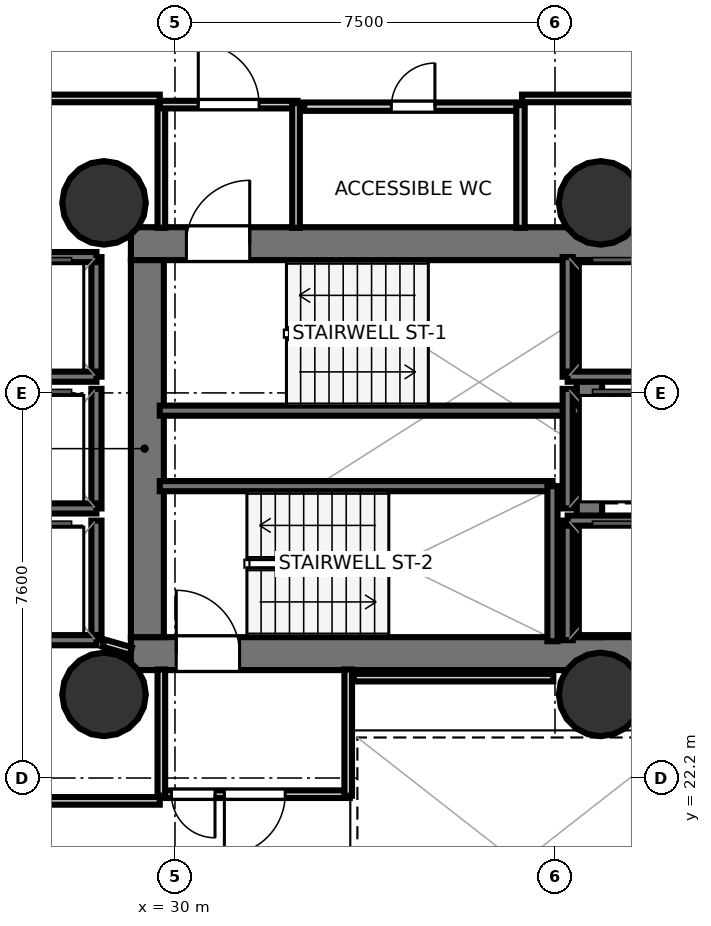
"""IFC4 building model, lengths in metres.
Left out: names, types, materials, properties, quantities, classifications, styles, units other than length and angle.
Written with IfcOpenShell. Run it as: python <this file> out.ifc"""

import sys

from ifc_helpers import new_model, si_unit, direction, frame, frame_2d, origin, origin_2d, place, context, subcontext, project, spatial, rectangle, hollow_circle, extrude, element, fill, save


model = new_model("IFC4")
c1 = context("Model", 3, precision=1e-05, world=origin(), true_north=direction((0.0, 1.0)))
c2 = subcontext(c1, "Body", "Model", "MODEL_VIEW")
j1 = project(units=[si_unit("LENGTHUNIT", "METRE"), si_unit("PLANEANGLEUNIT", "RADIAN")], contexts=[c1])
p1 = place(None, origin())
s1 = spatial("IfcSite", under=j1, at=p1, CompositionType="ELEMENT")
p2 = place(p1, origin())
s2 = spatial("IfcBuilding", under=s1, at=p2, CompositionType="ELEMENT")
p3 = place(p2, frame((0.0, 0.0, 63.6)))
s3 = spatial("IfcBuildingStorey", under=s2, at=p3, CompositionType="ELEMENT", Elevation=63.6)
p4 = place(p3, frame((29.13, 32.745, 0.0), z_axis=(0.0, 0.0, 1.0), x_axis=(1.0, 0.0, 0.0)))
e1 = element("IfcWall", 1, at=p4, inside=s3, PredefinedType="SHEAR", context=c2, shape_type="SweptSolid", body=[
    extrude(rectangle(XDim=10.72, YDim=0.65, at=frame_2d((5.36, 0.0))), origin(), (0.0, 0.0, 1.0), 3.52),
])
p5 = place(p4, frame((1.095, 0.0, 0.0)))
e2 = element("IfcOpeningElement", 2, at=p5, cuts=e1, PredefinedType="OPENING", context=c2, shape_type="SweptSolid", body=[
    extrude(rectangle(XDim=1.25, YDim=2.15, at=frame_2d((0.625, 1.075))), frame((0.0, 0.335, 0.0), z_axis=(0.0, -1.0, 0.0), x_axis=(1.0, 0.0, 0.0)), (0.0, 0.0, 1.0), 0.67),
])
p6 = place(p3, frame((29.13, 24.655, 0.0), z_axis=(0.0, 0.0, 1.0), x_axis=(1.0, 0.0, 0.0)))
e3 = element("IfcWall", 3, at=p6, inside=s3, PredefinedType="SHEAR", context=c2, shape_type="SweptSolid", body=[
    extrude(rectangle(XDim=10.72, YDim=0.65, at=frame_2d((5.36, 0.0))), origin(), (0.0, 0.0, 1.0), 3.52),
])
p7 = place(p6, frame((0.895, 0.0, 0.0)))
e4 = element("IfcOpeningElement", 4, at=p7, cuts=e3, PredefinedType="OPENING", context=c2, shape_type="SweptSolid", body=[
    extrude(rectangle(XDim=1.25, YDim=2.15, at=frame_2d((0.625, 1.075))), frame((0.0, 0.335, 0.0), z_axis=(0.0, -1.0, 0.0), x_axis=(1.0, 0.0, 0.0)), (0.0, 0.0, 1.0), 0.67),
])
p8 = place(p3, frame((29.455, 24.98, 0.0), z_axis=(0.0, 0.0, 1.0), x_axis=(0.0, 1.0, 0.0)))
e5 = element("IfcWall", 5, at=p8, inside=s3, PredefinedType="SHEAR", context=c2, shape_type="SweptSolid", body=[
    extrude(rectangle(XDim=7.44, YDim=0.65, at=frame_2d((3.72, 0.0))), origin(), (0.0, 0.0, 1.0), 3.52),
])
p9 = place(p3, frame((38.18, 24.98, 0.0), z_axis=(0.0, 0.0, 1.0), x_axis=(0.0, 1.0, 0.0)))
e6 = element("IfcWall", 6, at=p9, inside=s3, PredefinedType="SHEAR", context=c2, shape_type="SweptSolid", body=[
    extrude(rectangle(XDim=7.44, YDim=0.5, at=frame_2d((3.72, 0.0))), origin(), (0.0, 0.0, 1.0), 3.52),
])
for number, where, z_axis, x_axis in (
    (7, (28.6, 33.55, 0.0), (0.0, 0.0, 1.0), (1.0, 0.0, 0.0)),
    (8, (28.6, 23.85, 0.0), (0.0, 0.0, 1.0), (1.0, 0.0, 0.0)),
    (9, (38.4, 33.55, 0.0), (0.0, 0.0, 1.0), (1.0, 0.0, 0.0)),
    (10, (38.4, 23.85, 0.0), (0.0, 0.0, 1.0), (1.0, 0.0, 0.0)),
):
    element("IfcColumn", number, at=place(p3, frame(where, z_axis=z_axis, x_axis=x_axis)), inside=s3, PredefinedType="COLUMN", context=c2, shape_type="SweptSolid", body=[
        extrude(hollow_circle(Radius=0.825, WallThickness=0.04, at=origin_2d()), origin(), (0.0, 0.0, 1.0), 3.7),
    ])
p10 = place(p3, frame((29.7, 29.45, 0.0), z_axis=(0.0, 0.0, 1.0), x_axis=(1.0, 0.0, 0.0)))
e11 = element("IfcWall", 11, at=p10, inside=s3, PredefinedType="SOLIDWALL", context=c2, shape_type="SweptSolid", body=[
    extrude(rectangle(XDim=8.3, YDim=0.2, at=frame_2d((4.15, 0.0))), origin(), (0.0, 0.0, 1.0), 3.52),
])
p11 = place(p3, frame((29.7, 27.96, 0.0), z_axis=(0.0, 0.0, 1.0), x_axis=(1.0, 0.0, 0.0)))
e12 = element("IfcWall", 12, at=p11, inside=s3, PredefinedType="SOLIDWALL", context=c2, shape_type="SweptSolid", body=[
    extrude(rectangle(XDim=7.75, YDim=0.2, at=frame_2d((3.875, 0.0))), origin(), (0.0, 0.0, 1.0), 3.52),
])
p12 = place(p3, frame((37.45, 24.9, 0.0), z_axis=(0.0, 0.0, 1.0), x_axis=(0.0, 1.0, 0.0)))
e13 = element("IfcWall", 13, at=p12, inside=s3, PredefinedType="SOLIDWALL", context=c2, shape_type="SweptSolid", body=[
    extrude(rectangle(XDim=3.06, YDim=0.2, at=frame_2d((1.53, 0.0))), origin(), (0.0, 0.0, 1.0), 3.52),
])
p13 = place(p3, frame((37.75, 30.12, 0.0), z_axis=(0.0, 0.0, 1.0), x_axis=(0.0, 1.0, 0.0)))
e14 = element("IfcWall", 14, at=p13, inside=s3, PredefinedType="SOLIDWALL", context=c2, shape_type="SweptSolid", body=[
    extrude(rectangle(XDim=2.36, YDim=0.2, at=frame_2d((1.18, 0.0))), origin(), (0.0, 0.0, 1.0), 3.52),
])
p14 = place(p3, frame((37.75, 30.12, 0.0), z_axis=(0.0, 0.0, 1.0), x_axis=(1.0, 0.0, 0.0)))
e15 = element("IfcWall", 15, at=p14, inside=s3, PredefinedType="SOLIDWALL", context=c2, shape_type="SweptSolid", body=[
    extrude(rectangle(XDim=2.1, YDim=0.2, at=frame_2d((1.05, 0.0))), origin(), (0.0, 0.0, 1.0), 3.52),
])
p15 = place(p3, frame((37.75, 24.92, 0.0), z_axis=(0.0, 0.0, 1.0), x_axis=(0.0, 1.0, 0.0)))
e16 = element("IfcWall", 16, at=p15, inside=s3, PredefinedType="SOLIDWALL", context=c2, shape_type="SweptSolid", body=[
    extrude(rectangle(XDim=2.36, YDim=0.2, at=frame_2d((1.18, 0.0))), origin(), (0.0, 0.0, 1.0), 3.52),
])
p16 = place(p3, frame((37.75, 27.28, 0.0), z_axis=(0.0, 0.0, 1.0), x_axis=(1.0, 0.0, 0.0)))
e17 = element("IfcWall", 17, at=p16, inside=s3, PredefinedType="SOLIDWALL", context=c2, shape_type="SweptSolid", body=[
    extrude(rectangle(XDim=2.1, YDim=0.2, at=frame_2d((1.05, 0.0))), origin(), (0.0, 0.0, 1.0), 3.52),
])
p17 = place(p3, frame((28.45, 30.12, 0.0), z_axis=(0.0, 0.0, 1.0), x_axis=(0.0, 1.0, 0.0)))
e18 = element("IfcWall", 18, at=p17, inside=s3, PredefinedType="SOLIDWALL", context=c2, shape_type="SweptSolid", body=[
    extrude(rectangle(XDim=2.36, YDim=0.2, at=frame_2d((1.18, 0.0))), origin(), (0.0, 0.0, 1.0), 3.52),
])
for number, where, z_axis, x_axis in (
    (19, (26.35, 32.48, 0.0), (0.0, 0.0, 1.0), (1.0, 0.0, 0.0)),
    (20, (26.35, 30.12, 0.0), (0.0, 0.0, 1.0), (1.0, 0.0, 0.0)),
):
    element("IfcWall", number, at=place(p3, frame(where, z_axis=z_axis, x_axis=x_axis)), inside=s3, PredefinedType="SOLIDWALL", context=c2, shape_type="SweptSolid", body=[
        extrude(rectangle(XDim=2.1, YDim=0.2, at=frame_2d((1.05, 0.0))), origin(), (0.0, 0.0, 1.0), 3.52),
    ])
p18 = place(p3, frame((28.45, 27.52, 0.0), z_axis=(0.0, 0.0, 1.0), x_axis=(0.0, 1.0, 0.0)))
e21 = element("IfcWall", 21, at=p18, inside=s3, PredefinedType="SOLIDWALL", context=c2, shape_type="SweptSolid", body=[
    extrude(rectangle(XDim=2.36, YDim=0.2, at=frame_2d((1.18, 0.0))), origin(), (0.0, 0.0, 1.0), 3.52),
])
p19 = place(p3, frame((26.35, 27.52, 0.0), z_axis=(0.0, 0.0, 1.0), x_axis=(1.0, 0.0, 0.0)))
e22 = element("IfcWall", 22, at=p19, inside=s3, PredefinedType="SOLIDWALL", context=c2, shape_type="SweptSolid", body=[
    extrude(rectangle(XDim=2.1, YDim=0.2, at=frame_2d((1.05, 0.0))), origin(), (0.0, 0.0, 1.0), 3.52),
])
p20 = place(p3, frame((28.45, 24.92, 0.0), z_axis=(0.0, 0.0, 1.0), x_axis=(0.0, 1.0, 0.0)))
e23 = element("IfcWall", 23, at=p20, inside=s3, PredefinedType="SOLIDWALL", context=c2, shape_type="SweptSolid", body=[
    extrude(rectangle(XDim=2.36, YDim=0.2, at=frame_2d((1.18, 0.0))), origin(), (0.0, 0.0, 1.0), 3.52),
])
p21 = place(p3, frame((26.35, 24.92, 0.0), z_axis=(0.0, 0.0, 1.0), x_axis=(1.0, 0.0, 0.0)))
e24 = element("IfcWall", 24, at=p21, inside=s3, PredefinedType="SOLIDWALL", context=c2, shape_type="SweptSolid", body=[
    extrude(rectangle(XDim=2.1, YDim=0.2, at=frame_2d((1.05, 0.0))), origin(), (0.0, 0.0, 1.0), 3.52),
])
p22 = place(p3, frame((37.75, 27.52, 0.0), z_axis=(0.0, 0.0, 1.0), x_axis=(0.0, 1.0, 0.0)))
e25 = element("IfcWall", 25, at=p22, inside=s3, PredefinedType="SOLIDWALL", context=c2, shape_type="SweptSolid", body=[
    extrude(rectangle(XDim=2.36, YDim=0.2, at=frame_2d((1.18, 0.0))), origin(), (0.0, 0.0, 1.0), 3.52),
])
p23 = place(p3, frame((29.731, 33.058, 0.0), z_axis=(0.0, 0.0, 1.0), x_axis=(0.0, 1.0, 0.0)))
e26 = element("IfcWall", 26, at=p23, inside=s3, PredefinedType="PARTITIONING", context=c2, shape_type="SweptSolid", body=[
    extrude(rectangle(XDim=2.462, YDim=0.15, at=frame_2d((1.231, 0.0))), origin(), (0.0, 0.0, 1.0), 2.84),
])
p24 = place(p3, frame((29.7, 35.489, 0.0), z_axis=(0.0, 0.0, 1.0), x_axis=(1.0, 0.0, 0.0)))
e27 = element("IfcWall", 27, at=p24, inside=s3, PredefinedType="PARTITIONING", context=c2, shape_type="SweptSolid", body=[
    extrude(rectangle(XDim=2.72, YDim=0.15, at=frame_2d((1.36, 0.0))), origin(), (0.0, 0.0, 1.0), 2.84),
])
p25 = place(p24, frame((0.76, 0.0, 0.0)))
e28 = element("IfcOpeningElement", 28, at=p25, cuts=e27, PredefinedType="OPENING", context=c2, shape_type="SweptSolid", body=[
    extrude(rectangle(XDim=1.2, YDim=2.15, at=frame_2d((0.6, 1.075))), frame((0.0, 0.085, 0.0), z_axis=(0.0, -1.0, 0.0), x_axis=(1.0, 0.0, 0.0)), (0.0, 0.0, 1.0), 0.17),
])
p26 = place(p3, frame((32.389, 35.52, 0.0), z_axis=(0.0, 0.0, 1.0), x_axis=(0.0, -1.0, 0.0)))
e29 = element("IfcWall", 29, at=p26, inside=s3, PredefinedType="PARTITIONING", context=c2, shape_type="SweptSolid", body=[
    extrude(rectangle(XDim=2.462, YDim=0.15, at=frame_2d((1.231, 0.0))), origin(), (0.0, 0.0, 1.0), 2.84),
])
p27 = place(p3, frame((33.45, 21.881, 0.0), z_axis=(0.0, 0.0, 1.0), x_axis=(-1.0, 0.0, 0.0)))
e30 = element("IfcWall", 30, at=p27, inside=s3, PredefinedType="PARTITIONING", context=c2, shape_type="SweptSolid", body=[
    extrude(rectangle(XDim=3.75, YDim=0.15, at=frame_2d((1.875, 0.0))), origin(), (0.0, 0.0, 1.0), 2.84),
])
p28 = place(p27, frame((1.275, 0.0, 0.0)))
e31 = element("IfcOpeningElement", 31, at=p28, cuts=e30, PredefinedType="OPENING", context=c2, shape_type="SweptSolid", body=[
    extrude(rectangle(XDim=1.2, YDim=2.15, at=frame_2d((0.6, 1.075))), frame((0.0, 0.085, 0.0), z_axis=(0.0, -1.0, 0.0), x_axis=(1.0, 0.0, 0.0)), (0.0, 0.0, 1.0), 0.17),
])
p29 = place(p27, frame((2.66, 0.0, 0.0)))
e32 = element("IfcOpeningElement", 32, at=p29, cuts=e30, PredefinedType="OPENING", context=c2, shape_type="SweptSolid", body=[
    extrude(rectangle(XDim=0.86, YDim=2.05, at=frame_2d((0.43, 1.025))), frame((0.0, 0.085, 0.0), z_axis=(0.0, -1.0, 0.0), x_axis=(1.0, 0.0, 0.0)), (0.0, 0.0, 1.0), 0.17),
])
for number, where, z_axis, x_axis in (
    (33, (29.731, 21.85, 0.0), (0.0, 0.0, 1.0), (0.0, 1.0, 0.0)),
    (34, (33.419, 24.342, 0.0), (0.0, 0.0, 1.0), (0.0, -1.0, 0.0)),
):
    element("IfcWall", number, at=place(p3, frame(where, z_axis=z_axis, x_axis=x_axis)), inside=s3, PredefinedType="PARTITIONING", context=c2, shape_type="SweptSolid", body=[
        extrude(rectangle(XDim=2.492, YDim=0.15, at=frame_2d((1.246, 0.0))), origin(), (0.0, 0.0, 1.0), 2.84),
    ])
p30 = place(p3, frame((32.55, 35.449, 0.0), z_axis=(0.0, 0.0, 1.0), x_axis=(1.0, 0.0, 0.0)))
e35 = element("IfcWall", 35, at=p30, inside=s3, PredefinedType="PLUMBINGWALL", context=c2, shape_type="SweptSolid", body=[
    extrude(rectangle(XDim=4.3, YDim=0.165, at=frame_2d((2.15, 0.0))), origin(), (0.0, 0.0, 1.0), 2.84),
])
p31 = place(p30, frame((1.72, 0.0, 0.0)))
e36 = element("IfcOpeningElement", 36, at=p31, cuts=e35, PredefinedType="OPENING", context=c2, shape_type="SweptSolid", body=[
    extrude(rectangle(XDim=0.86, YDim=2.05, at=frame_2d((0.43, 1.025))), frame((0.0, 0.093, 0.0), z_axis=(0.0, -1.0, 0.0), x_axis=(1.0, 0.0, 0.0)), (0.0, 0.0, 1.0), 0.185),
])
p32 = place(p3, frame((36.819, 35.48, 0.0), z_axis=(0.0, 0.0, 1.0), x_axis=(0.0, -1.0, 0.0)))
e37 = element("IfcWall", 37, at=p32, inside=s3, PredefinedType="PLUMBINGWALL", context=c2, shape_type="SweptSolid", body=[
    extrude(rectangle(XDim=2.422, YDim=0.165, at=frame_2d((1.211, 0.0))), origin(), (0.0, 0.0, 1.0), 2.84),
])
p33 = place(p3, frame((29.13, 24.706, 0.0), z_axis=(0.0, 0.0, 1.0), x_axis=(-0.960451214223, 0.278448316742, 0.0)))
e38 = element("IfcWall", 38, at=p33, inside=s3, PredefinedType="PARTITIONING", context=c2, shape_type="SweptSolid", body=[
    extrude(rectangle(XDim=0.562, YDim=0.15, at=frame_2d((0.281, 0.0))), origin(), (0.0, 0.0, 1.0), 2.84),
])
p34 = place(p3, frame((37.467, 24.181, 0.0), z_axis=(0.0, 0.0, 1.0), x_axis=(-1.0, 0.0, 0.0)))
e39 = element("IfcWall", 39, at=p34, inside=s3, PredefinedType="PARTITIONING", context=c2, shape_type="SweptSolid", body=[
    extrude(rectangle(XDim=3.937, YDim=0.15, at=frame_2d((1.968, 0.0))), origin(), (0.0, 0.0, 1.0), 2.84),
])
p35 = place(p3, frame((39.818, 35.611, 0.0), z_axis=(0.0, 0.0, 1.0), x_axis=(-1.0, 0.0, 0.0)))
e40 = element("IfcWall", 40, at=p35, inside=s3, PredefinedType="PARTITIONING", context=c2, shape_type="SweptSolid", body=[
    extrude(rectangle(XDim=2.968, YDim=0.15, at=frame_2d((1.484, 0.0))), origin(), (0.0, 0.0, 1.0), 2.84),
])
p36 = place(p3, frame((29.7, 35.611, 0.0), z_axis=(0.0, 0.0, 1.0), x_axis=(-1.0, 0.0, 0.0)))
e41 = element("IfcWall", 41, at=p36, inside=s3, PredefinedType="PARTITIONING", context=c2, shape_type="SweptSolid", body=[
    extrude(rectangle(XDim=3.28, YDim=0.15, at=frame_2d((1.64, 0.0))), origin(), (0.0, 0.0, 1.0), 2.798),
])
p37 = place(p3, frame((26.42, 21.749, 0.0), z_axis=(0.0, 0.0, 1.0), x_axis=(1.0, 0.0, 0.0)))
e42 = element("IfcWall", 42, at=p37, inside=s3, PredefinedType="PARTITIONING", context=c2, shape_type="SweptSolid", body=[
    extrude(rectangle(XDim=3.28, YDim=0.15, at=frame_2d((1.64, 0.0))), origin(), (0.0, 0.0, 1.0), 2.84),
])
p38 = place(p5, origin())
e43 = element("IfcDoor", 43, at=p38, inside=s3, OperationType="SINGLE_SWING_RIGHT", PredefinedType="DOOR", context=c2, shape_type="SweptSolid", body=[
    extrude(rectangle(XDim=1.25, YDim=2.15, at=frame_2d((0.625, 1.075))), frame((0.0, 0.025, 0.0), z_axis=(0.0, -1.0, 0.0), x_axis=(1.0, 0.0, 0.0)), (0.0, 0.0, 1.0), 0.05),
])
fill(e2, e43)
p39 = place(p7, origin())
e44 = element("IfcDoor", 44, at=p39, inside=s3, OperationType="SINGLE_SWING_LEFT", PredefinedType="DOOR", context=c2, shape_type="SweptSolid", body=[
    extrude(rectangle(XDim=1.25, YDim=2.15, at=frame_2d((0.625, 1.075))), frame((0.0, 0.025, 0.0), z_axis=(0.0, -1.0, 0.0), x_axis=(1.0, 0.0, 0.0)), (0.0, 0.0, 1.0), 0.05),
])
fill(e4, e44)
p40 = place(p25, origin())
e45 = element("IfcDoor", 45, at=p40, inside=s3, OperationType="SINGLE_SWING_LEFT", PredefinedType="DOOR", context=c2, shape_type="SweptSolid", body=[
    extrude(rectangle(XDim=1.2, YDim=2.15, at=frame_2d((0.6, 1.075))), frame((0.0, 0.025, 0.0), z_axis=(0.0, -1.0, 0.0), x_axis=(1.0, 0.0, 0.0)), (0.0, 0.0, 1.0), 0.05),
])
fill(e28, e45)
p41 = place(p28, origin())
e46 = element("IfcDoor", 46, at=p41, inside=s3, OperationType="SINGLE_SWING_RIGHT", PredefinedType="DOOR", context=c2, shape_type="SweptSolid", body=[
    extrude(rectangle(XDim=1.2, YDim=2.15, at=frame_2d((0.6, 1.075))), frame((0.0, 0.025, 0.0), z_axis=(0.0, -1.0, 0.0), x_axis=(1.0, 0.0, 0.0)), (0.0, 0.0, 1.0), 0.05),
])
fill(e31, e46)
p42 = place(p31, origin())
e47 = element("IfcDoor", 47, at=p42, inside=s3, OperationType="SINGLE_SWING_RIGHT", PredefinedType="DOOR", context=c2, shape_type="SweptSolid", body=[
    extrude(rectangle(XDim=0.86, YDim=2.05, at=frame_2d((0.43, 1.025))), frame((0.0, 0.025, 0.0), z_axis=(0.0, -1.0, 0.0), x_axis=(1.0, 0.0, 0.0)), (0.0, 0.0, 1.0), 0.05),
])
fill(e36, e47)
p43 = place(p29, origin())
e48 = element("IfcDoor", 48, at=p43, inside=s3, OperationType="SINGLE_SWING_LEFT", PredefinedType="DOOR", context=c2, shape_type="SweptSolid", body=[
    extrude(rectangle(XDim=0.86, YDim=2.05, at=frame_2d((0.43, 1.025))), frame((0.0, 0.025, 0.0), z_axis=(0.0, -1.0, 0.0), x_axis=(1.0, 0.0, 0.0)), (0.0, 0.0, 1.0), 0.05),
])
fill(e32, e48)
save(model, sys.argv[1])
